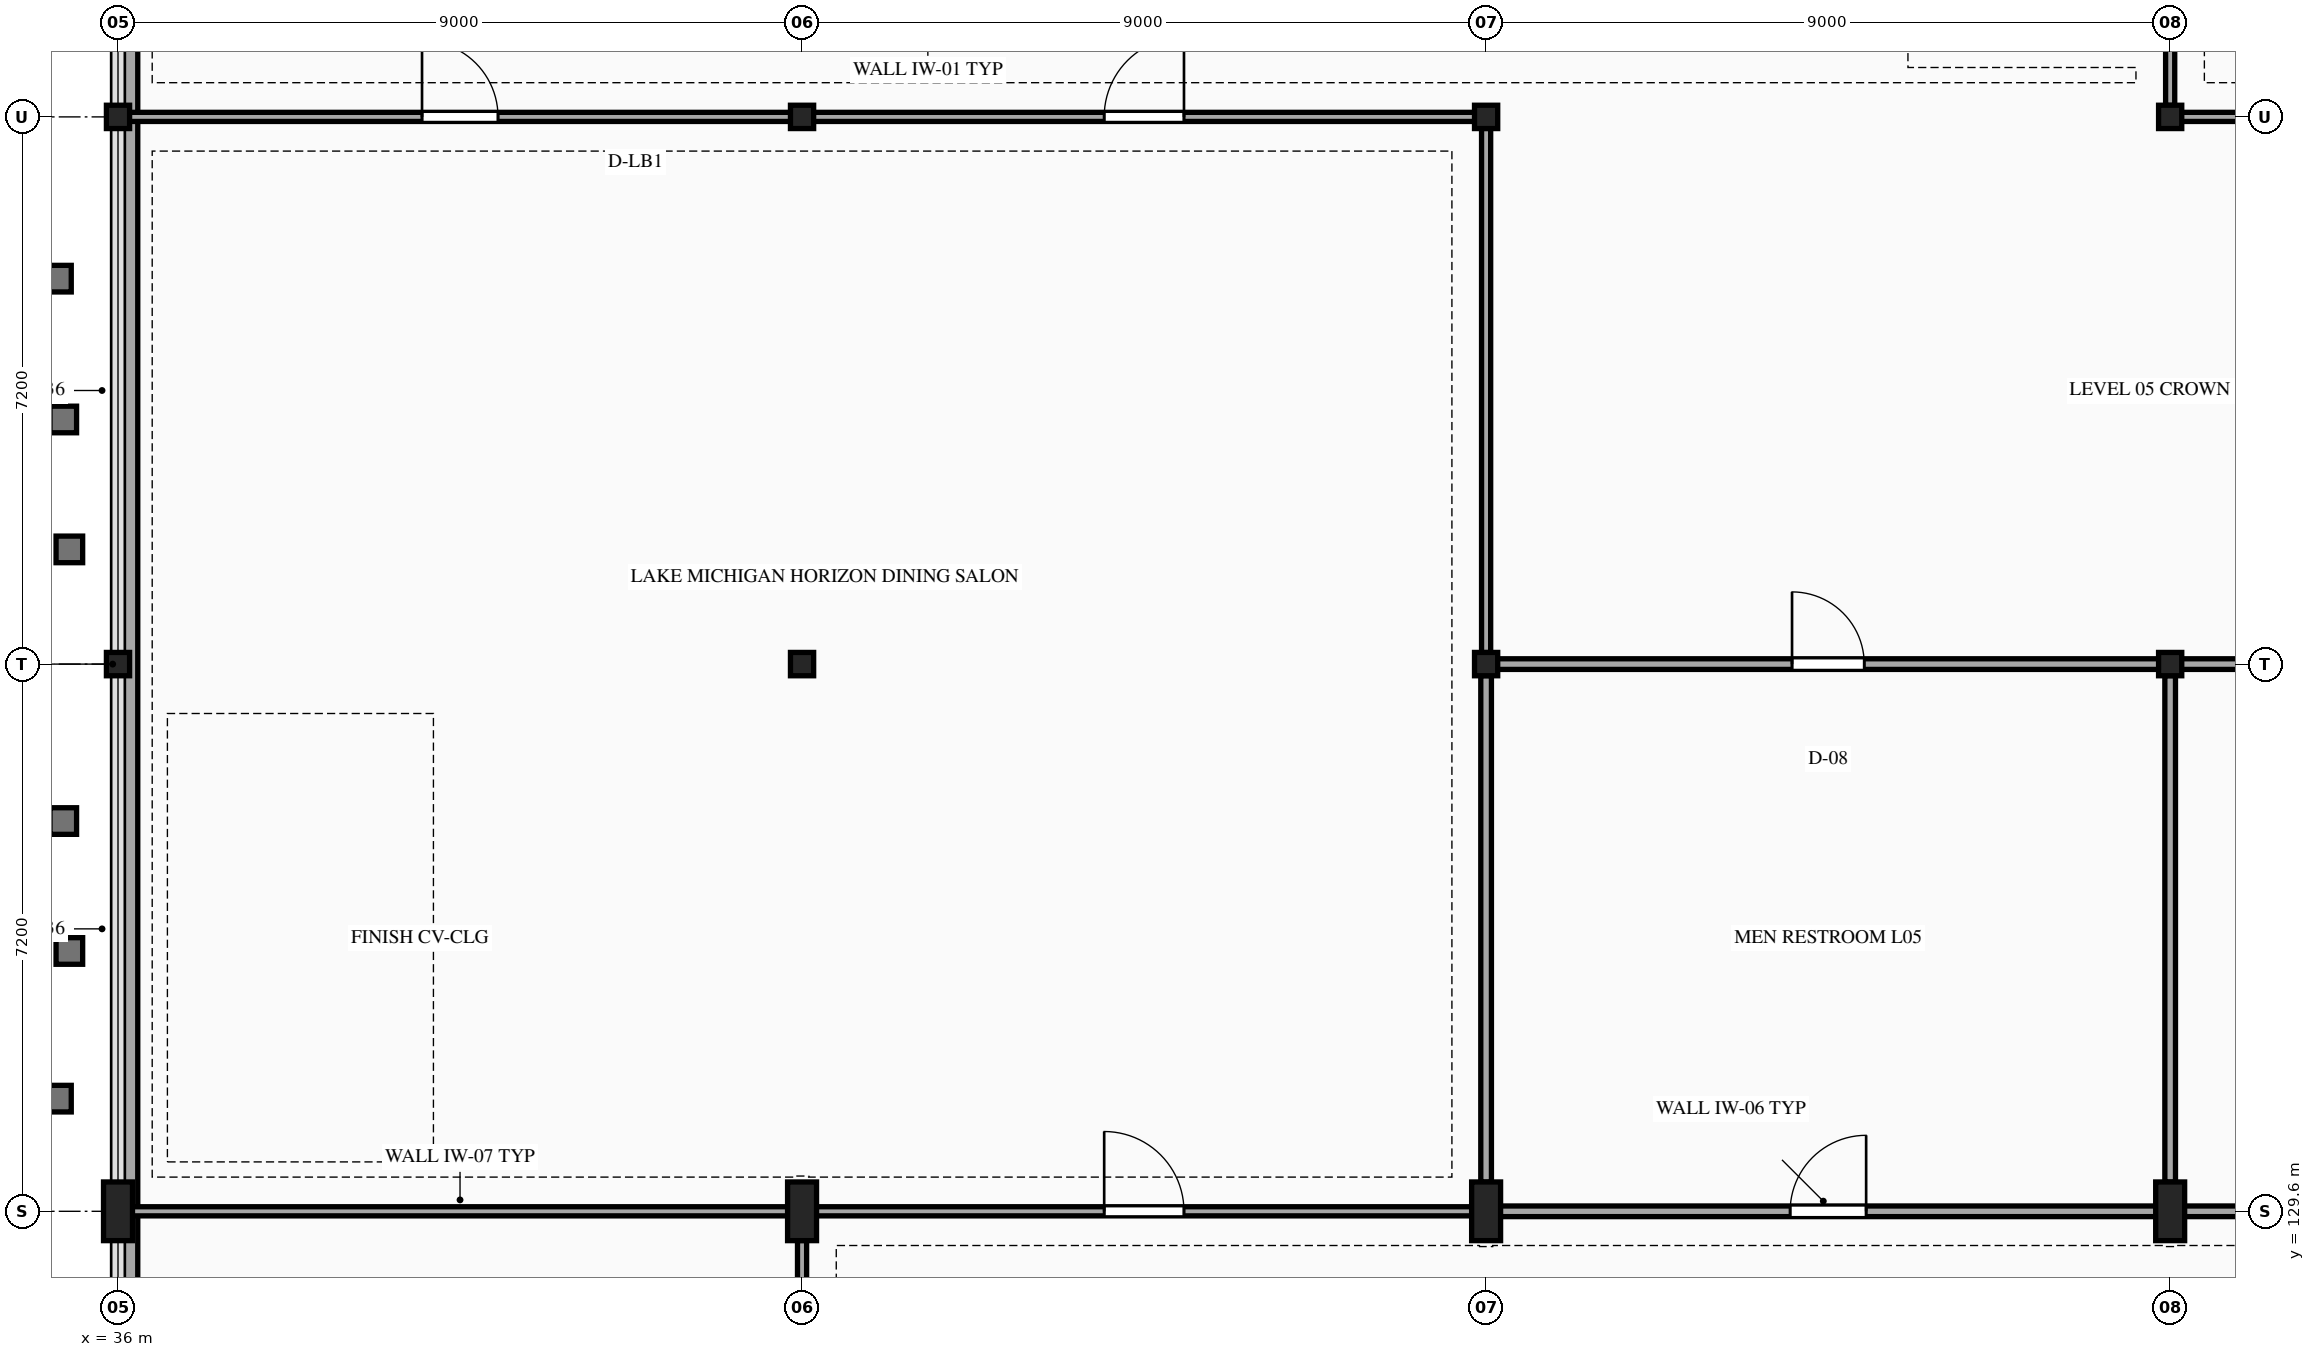
"""IFC4 building model, lengths in metres.
Left out: names, types, materials, properties, quantities, classifications, styles, units other than length and angle.
Written with IfcOpenShell. Run it as: python <this file> out.ifc"""

import sys

from ifc_helpers import new_model, si_unit, direction, frame, frame_2d, origin, origin_2d, place, context, subcontext, project, spatial, rectangle, i_section, extrude, element, fill, save


model = new_model("IFC4")
c1 = context("Model", 3, precision=1e-05, world=origin(), true_north=direction((0.0, 1.0)))
c2 = subcontext(c1, "Body", "Model", "MODEL_VIEW")
j1 = project(units=[si_unit("LENGTHUNIT", "METRE"), si_unit("PLANEANGLEUNIT", "RADIAN")], contexts=[c1])
p1 = place(None, origin())
s1 = spatial("IfcSite", under=j1, at=p1, CompositionType="ELEMENT")
p2 = place(p1, origin())
s2 = spatial("IfcBuilding", under=s1, at=p2, CompositionType="ELEMENT")
p3 = place(p2, frame((0.0, 0.0, 24.3)))
s3 = spatial("IfcBuildingStorey", under=s2, at=p3, CompositionType="ELEMENT", Elevation=24.3)
p4 = place(p3, frame((36.0, 129.6, 0.0), z_axis=(0.0, 0.0, 1.0), x_axis=(1.0, 0.0, 0.0)))
e1 = element("IfcColumn", 1, at=p4, inside=s3, PredefinedType="COLUMN", context=c2, shape_type="SweptSolid", body=[
    extrude(i_section(OverallWidth=0.381, OverallDepth=0.772, WebThickness=0.017, FlangeThickness=0.027, at=origin_2d()), origin(), (0.0, 0.0, 1.0), 4.5),
])
for number, where, z_axis, x_axis in (
    (2, (36.0, 136.8, 0.0), (0.0, 0.0, 1.0), (1.0, 0.0, 0.0)),
    (3, (36.0, 144.0, 0.0), (0.0, 0.0, 1.0), (1.0, 0.0, 0.0)),
):
    element("IfcColumn", number, at=place(p3, frame(where, z_axis=z_axis, x_axis=x_axis)), inside=s3, PredefinedType="COLUMN", context=c2, shape_type="SweptSolid", body=[
        extrude(i_section(OverallWidth=0.305, OverallDepth=0.307, WebThickness=0.01, FlangeThickness=0.015, at=origin_2d()), origin(), (0.0, 0.0, 1.0), 4.5),
    ])
p5 = place(p3, frame((45.0, 129.6, 0.0), z_axis=(0.0, 0.0, 1.0), x_axis=(1.0, 0.0, 0.0)))
e4 = element("IfcColumn", 4, at=p5, inside=s3, PredefinedType="COLUMN", context=c2, shape_type="SweptSolid", body=[
    extrude(i_section(OverallWidth=0.381, OverallDepth=0.772, WebThickness=0.017, FlangeThickness=0.027, at=origin_2d()), origin(), (0.0, 0.0, 1.0), 4.5),
])
for number, where, z_axis, x_axis in (
    (5, (45.0, 136.8, 0.0), (0.0, 0.0, 1.0), (1.0, 0.0, 0.0)),
    (6, (45.0, 144.0, 0.0), (0.0, 0.0, 1.0), (1.0, 0.0, 0.0)),
):
    element("IfcColumn", number, at=place(p3, frame(where, z_axis=z_axis, x_axis=x_axis)), inside=s3, PredefinedType="COLUMN", context=c2, shape_type="SweptSolid", body=[
        extrude(i_section(OverallWidth=0.305, OverallDepth=0.307, WebThickness=0.01, FlangeThickness=0.015, at=origin_2d()), origin(), (0.0, 0.0, 1.0), 4.5),
    ])
p6 = place(p3, frame((54.0, 129.6, 0.0), z_axis=(0.0, 0.0, 1.0), x_axis=(1.0, 0.0, 0.0)))
e7 = element("IfcColumn", 7, at=p6, inside=s3, PredefinedType="COLUMN", context=c2, shape_type="SweptSolid", body=[
    extrude(i_section(OverallWidth=0.381, OverallDepth=0.772, WebThickness=0.017, FlangeThickness=0.027, at=origin_2d()), origin(), (0.0, 0.0, 1.0), 4.5),
])
for number, where, z_axis, x_axis in (
    (8, (54.0, 136.8, 0.0), (0.0, 0.0, 1.0), (1.0, 0.0, 0.0)),
    (9, (54.0, 144.0, 0.0), (0.0, 0.0, 1.0), (1.0, 0.0, 0.0)),
):
    element("IfcColumn", number, at=place(p3, frame(where, z_axis=z_axis, x_axis=x_axis)), inside=s3, PredefinedType="COLUMN", context=c2, shape_type="SweptSolid", body=[
        extrude(i_section(OverallWidth=0.305, OverallDepth=0.307, WebThickness=0.01, FlangeThickness=0.015, at=origin_2d()), origin(), (0.0, 0.0, 1.0), 4.5),
    ])
p7 = place(p3, frame((63.0, 129.6, 0.0), z_axis=(0.0, 0.0, 1.0), x_axis=(1.0, 0.0, 0.0)))
e10 = element("IfcColumn", 10, at=p7, inside=s3, PredefinedType="COLUMN", context=c2, shape_type="SweptSolid", body=[
    extrude(i_section(OverallWidth=0.381, OverallDepth=0.772, WebThickness=0.017, FlangeThickness=0.027, at=origin_2d()), origin(), (0.0, 0.0, 1.0), 4.5),
])
for number, where, z_axis, x_axis in (
    (11, (63.0, 136.8, 0.0), (0.0, 0.0, 1.0), (1.0, 0.0, 0.0)),
    (12, (63.0, 144.0, 0.0), (0.0, 0.0, 1.0), (1.0, 0.0, 0.0)),
):
    element("IfcColumn", number, at=place(p3, frame(where, z_axis=z_axis, x_axis=x_axis)), inside=s3, PredefinedType="COLUMN", context=c2, shape_type="SweptSolid", body=[
        extrude(i_section(OverallWidth=0.305, OverallDepth=0.307, WebThickness=0.01, FlangeThickness=0.015, at=origin_2d()), origin(), (0.0, 0.0, 1.0), 4.5),
    ])
p8 = place(p3, frame((36.14, 108.14, 4.5), z_axis=(0.0, 0.0, 1.0), x_axis=(0.0, 1.0, 0.0)))
e13 = element("IfcWall", 13, at=p8, inside=s3, PredefinedType="PARAPET", context=c2, shape_type="SweptSolid", body=[
    extrude(rectangle(XDim=57.32, YDim=0.24, at=frame_2d((28.66, 0.0))), origin(), (0.0, 0.0, 1.0), 0.65),
])
p9 = place(p3, frame((36.006, 129.6, 0.0), z_axis=(0.0, 0.0, 1.0), x_axis=(1.0, 0.0, 0.0)))
e14 = element("IfcWall", 14, at=p9, inside=s3, PredefinedType="PARTITIONING", context=c2, shape_type="SweptSolid", body=[
    extrude(rectangle(XDim=8.987, YDim=0.12, at=frame_2d((4.494, 0.0))), origin(), (0.0, 0.0, 1.0), 3.648),
])
p10 = place(p3, frame((45.006, 129.6, 0.0), z_axis=(0.0, 0.0, 1.0), x_axis=(1.0, 0.0, 0.0)))
e15 = element("IfcWall", 15, at=p10, inside=s3, PredefinedType="PARTITIONING", context=c2, shape_type="SweptSolid", body=[
    extrude(rectangle(XDim=8.987, YDim=0.12, at=frame_2d((4.494, 0.0))), origin(), (0.0, 0.0, 1.0), 3.648),
])
p11 = place(p10, frame((3.969, 0.0, 0.0)))
e16 = element("IfcOpeningElement", 16, at=p11, cuts=e15, PredefinedType="OPENING", context=c2, shape_type="SweptSolid", body=[
    extrude(rectangle(XDim=1.05, YDim=2.15, at=frame_2d((0.525, 1.075))), frame((0.0, 0.07, 0.0), z_axis=(0.0, -1.0, 0.0), x_axis=(1.0, 0.0, 0.0)), (0.0, 0.0, 1.0), 0.14),
])
p12 = place(p3, frame((54.006, 129.6, 0.0), z_axis=(0.0, 0.0, 1.0), x_axis=(1.0, 0.0, 0.0)))
e17 = element("IfcWall", 17, at=p12, inside=s3, PredefinedType="PARTITIONING", context=c2, shape_type="SweptSolid", body=[
    extrude(rectangle(XDim=8.987, YDim=0.14, at=frame_2d((4.494, 0.0))), origin(), (0.0, 0.0, 1.0), 3.648),
])
p13 = place(p12, frame((3.994, 0.0, 0.0)))
e18 = element("IfcOpeningElement", 18, at=p13, cuts=e17, PredefinedType="OPENING", context=c2, shape_type="SweptSolid", body=[
    extrude(rectangle(XDim=1.0, YDim=2.15, at=frame_2d((0.5, 1.075))), frame((0.0, 0.08, 0.0), z_axis=(0.0, -1.0, 0.0), x_axis=(1.0, 0.0, 0.0)), (0.0, 0.0, 1.0), 0.16),
])
p14 = place(p3, frame((63.006, 129.6, 0.0), z_axis=(0.0, 0.0, 1.0), x_axis=(1.0, 0.0, 0.0)))
e19 = element("IfcWall", 19, at=p14, inside=s3, PredefinedType="PARTITIONING", context=c2, shape_type="SweptSolid", body=[
    extrude(rectangle(XDim=8.795, YDim=0.14, at=frame_2d((4.397, 0.0))), origin(), (0.0, 0.0, 1.0), 3.648),
])
p15 = place(p3, frame((54.005, 136.8, 0.0), z_axis=(0.0, 0.0, 1.0), x_axis=(1.0, 0.0, 0.0)))
e20 = element("IfcWall", 20, at=p15, inside=s3, PredefinedType="PARTITIONING", context=c2, shape_type="SweptSolid", body=[
    extrude(rectangle(XDim=8.99, YDim=0.14, at=frame_2d((4.495, 0.0))), origin(), (0.0, 0.0, 1.0), 3.648),
])
p16 = place(p15, frame((4.02, 0.0, 0.0)))
e21 = element("IfcOpeningElement", 21, at=p16, cuts=e20, PredefinedType="OPENING", context=c2, shape_type="SweptSolid", body=[
    extrude(rectangle(XDim=0.95, YDim=2.1, at=frame_2d((0.475, 1.05))), frame((0.0, 0.08, 0.0), z_axis=(0.0, -1.0, 0.0), x_axis=(1.0, 0.0, 0.0)), (0.0, 0.0, 1.0), 0.16),
])
p17 = place(p3, frame((63.005, 136.8, 0.0), z_axis=(0.0, 0.0, 1.0), x_axis=(1.0, 0.0, 0.0)))
e22 = element("IfcWall", 22, at=p17, inside=s3, PredefinedType="PARTITIONING", context=c2, shape_type="SweptSolid", body=[
    extrude(rectangle(XDim=8.796, YDim=0.14, at=frame_2d((4.398, 0.0))), origin(), (0.0, 0.0, 1.0), 3.648),
])
p18 = place(p17, frame((3.923, 0.0, 0.0)))
e23 = element("IfcOpeningElement", 23, at=p18, cuts=e22, PredefinedType="OPENING", context=c2, shape_type="SweptSolid", body=[
    extrude(rectangle(XDim=0.95, YDim=2.1, at=frame_2d((0.475, 1.05))), frame((0.0, 0.08, 0.0), z_axis=(0.0, -1.0, 0.0), x_axis=(1.0, 0.0, 0.0)), (0.0, 0.0, 1.0), 0.16),
])
p19 = place(p3, frame((36.005, 144.0, 0.0), z_axis=(0.0, 0.0, 1.0), x_axis=(1.0, 0.0, 0.0)))
e24 = element("IfcWall", 24, at=p19, inside=s3, PredefinedType="PARTITIONING", context=c2, shape_type="SweptSolid", body=[
    extrude(rectangle(XDim=8.99, YDim=0.12, at=frame_2d((4.495, 0.0))), origin(), (0.0, 0.0, 1.0), 3.648),
])
p20 = place(p19, frame((3.995, 0.0, 0.0)))
e25 = element("IfcOpeningElement", 25, at=p20, cuts=e24, PredefinedType="OPENING", context=c2, shape_type="SweptSolid", body=[
    extrude(rectangle(XDim=1.0, YDim=2.15, at=frame_2d((0.5, 1.075))), frame((0.0, 0.07, 0.0), z_axis=(0.0, -1.0, 0.0), x_axis=(1.0, 0.0, 0.0)), (0.0, 0.0, 1.0), 0.14),
])
p21 = place(p3, frame((45.005, 144.0, 0.0), z_axis=(0.0, 0.0, 1.0), x_axis=(1.0, 0.0, 0.0)))
e26 = element("IfcWall", 26, at=p21, inside=s3, PredefinedType="PARTITIONING", context=c2, shape_type="SweptSolid", body=[
    extrude(rectangle(XDim=8.99, YDim=0.12, at=frame_2d((4.495, 0.0))), origin(), (0.0, 0.0, 1.0), 3.648),
])
p22 = place(p21, frame((3.97, 0.0, 0.0)))
e27 = element("IfcOpeningElement", 27, at=p22, cuts=e26, PredefinedType="OPENING", context=c2, shape_type="SweptSolid", body=[
    extrude(rectangle(XDim=1.05, YDim=2.15, at=frame_2d((0.525, 1.075))), frame((0.0, 0.07, 0.0), z_axis=(0.0, -1.0, 0.0), x_axis=(1.0, 0.0, 0.0)), (0.0, 0.0, 1.0), 0.14),
])
p23 = place(p3, frame((63.005, 144.0, 0.0), z_axis=(0.0, 0.0, 1.0), x_axis=(1.0, 0.0, 0.0)))
e28 = element("IfcWall", 28, at=p23, inside=s3, PredefinedType="PARTITIONING", context=c2, shape_type="SweptSolid", body=[
    extrude(rectangle(XDim=8.796, YDim=0.12, at=frame_2d((4.398, 0.0))), origin(), (0.0, 0.0, 1.0), 3.648),
])
p24 = place(p23, frame((3.898, 0.0, 0.0)))
e29 = element("IfcOpeningElement", 29, at=p24, cuts=e28, PredefinedType="OPENING", context=c2, shape_type="SweptSolid", body=[
    extrude(rectangle(XDim=1.0, YDim=2.15, at=frame_2d((0.5, 1.075))), frame((0.0, 0.07, 0.0), z_axis=(0.0, -1.0, 0.0), x_axis=(1.0, 0.0, 0.0)), (0.0, 0.0, 1.0), 0.14),
])
p25 = place(p3, frame((45.0, 122.784, 0.0), z_axis=(0.0, 0.0, 1.0), x_axis=(0.0, 1.0, 0.0)))
e30 = element("IfcWall", 30, at=p25, inside=s3, PredefinedType="PARTITIONING", context=c2, shape_type="SweptSolid", body=[
    extrude(rectangle(XDim=6.432, YDim=0.12, at=frame_2d((3.216, 0.0))), origin(), (0.0, 0.0, 1.0), 3.648),
])
p26 = place(p3, frame((54.0, 129.984, 0.0), z_axis=(0.0, 0.0, 1.0), x_axis=(0.0, 1.0, 0.0)))
e31 = element("IfcWall", 31, at=p26, inside=s3, PredefinedType="PARTITIONING", context=c2, shape_type="SweptSolid", body=[
    extrude(rectangle(XDim=6.665, YDim=0.14, at=frame_2d((3.332, 0.0))), origin(), (0.0, 0.0, 1.0), 3.648),
])
p27 = place(p3, frame((54.0, 136.951, 0.0), z_axis=(0.0, 0.0, 1.0), x_axis=(0.0, 1.0, 0.0)))
e32 = element("IfcWall", 32, at=p27, inside=s3, PredefinedType="PARTITIONING", context=c2, shape_type="SweptSolid", body=[
    extrude(rectangle(XDim=6.897, YDim=0.12, at=frame_2d((3.448, 0.0))), origin(), (0.0, 0.0, 1.0), 3.648),
])
p28 = place(p3, frame((63.0, 129.984, 0.0), z_axis=(0.0, 0.0, 1.0), x_axis=(0.0, 1.0, 0.0)))
e33 = element("IfcWall", 33, at=p28, inside=s3, PredefinedType="PARTITIONING", context=c2, shape_type="SweptSolid", body=[
    extrude(rectangle(XDim=6.665, YDim=0.14, at=frame_2d((3.332, 0.0))), origin(), (0.0, 0.0, 1.0), 3.648),
])
p29 = place(p3, frame((63.0, 144.152, 0.0), z_axis=(0.0, 0.0, 1.0), x_axis=(0.0, 1.0, 0.0)))
e34 = element("IfcWall", 34, at=p29, inside=s3, PredefinedType="PARTITIONING", context=c2, shape_type="SweptSolid", body=[
    extrude(rectangle(XDim=6.897, YDim=0.12, at=frame_2d((3.448, 0.0))), origin(), (0.0, 0.0, 1.0), 3.648),
])
p30 = place(p11, origin())
e35 = element("IfcDoor", 35, at=p30, inside=s3, OperationType="SINGLE_SWING_LEFT", PredefinedType="DOOR", context=c2, shape_type="SweptSolid", body=[
    extrude(rectangle(XDim=1.05, YDim=2.15, at=frame_2d((0.525, 1.075))), frame((0.0, 0.025, 0.0), z_axis=(0.0, -1.0, 0.0), x_axis=(1.0, 0.0, 0.0)), (0.0, 0.0, 1.0), 0.05),
])
fill(e16, e35)
p31 = place(p13, origin())
e36 = element("IfcDoor", 36, at=p31, inside=s3, OperationType="SINGLE_SWING_RIGHT", PredefinedType="DOOR", context=c2, shape_type="SweptSolid", body=[
    extrude(rectangle(XDim=1.0, YDim=2.15, at=frame_2d((0.5, 1.075))), frame((0.0, 0.025, 0.0), z_axis=(0.0, -1.0, 0.0), x_axis=(1.0, 0.0, 0.0)), (0.0, 0.0, 1.0), 0.05),
])
fill(e18, e36)
p32 = place(p16, origin())
e37 = element("IfcDoor", 37, at=p32, inside=s3, OperationType="SINGLE_SWING_LEFT", PredefinedType="DOOR", context=c2, shape_type="SweptSolid", body=[
    extrude(rectangle(XDim=0.95, YDim=2.1, at=frame_2d((0.475, 1.05))), frame((0.0, 0.025, 0.0), z_axis=(0.0, -1.0, 0.0), x_axis=(1.0, 0.0, 0.0)), (0.0, 0.0, 1.0), 0.05),
])
fill(e21, e37)
p33 = place(p20, origin())
e38 = element("IfcDoor", 38, at=p33, inside=s3, OperationType="SINGLE_SWING_LEFT", PredefinedType="DOOR", context=c2, shape_type="SweptSolid", body=[
    extrude(rectangle(XDim=1.0, YDim=2.15, at=frame_2d((0.5, 1.075))), frame((0.0, 0.025, 0.0), z_axis=(0.0, -1.0, 0.0), x_axis=(1.0, 0.0, 0.0)), (0.0, 0.0, 1.0), 0.05),
])
fill(e25, e38)
p34 = place(p22, origin())
e39 = element("IfcDoor", 39, at=p34, inside=s3, OperationType="SINGLE_SWING_RIGHT", PredefinedType="DOOR", context=c2, shape_type="SweptSolid", body=[
    extrude(rectangle(XDim=1.05, YDim=2.15, at=frame_2d((0.525, 1.075))), frame((0.0, 0.025, 0.0), z_axis=(0.0, -1.0, 0.0), x_axis=(1.0, 0.0, 0.0)), (0.0, 0.0, 1.0), 0.05),
])
fill(e27, e39)
save(model, sys.argv[1])
